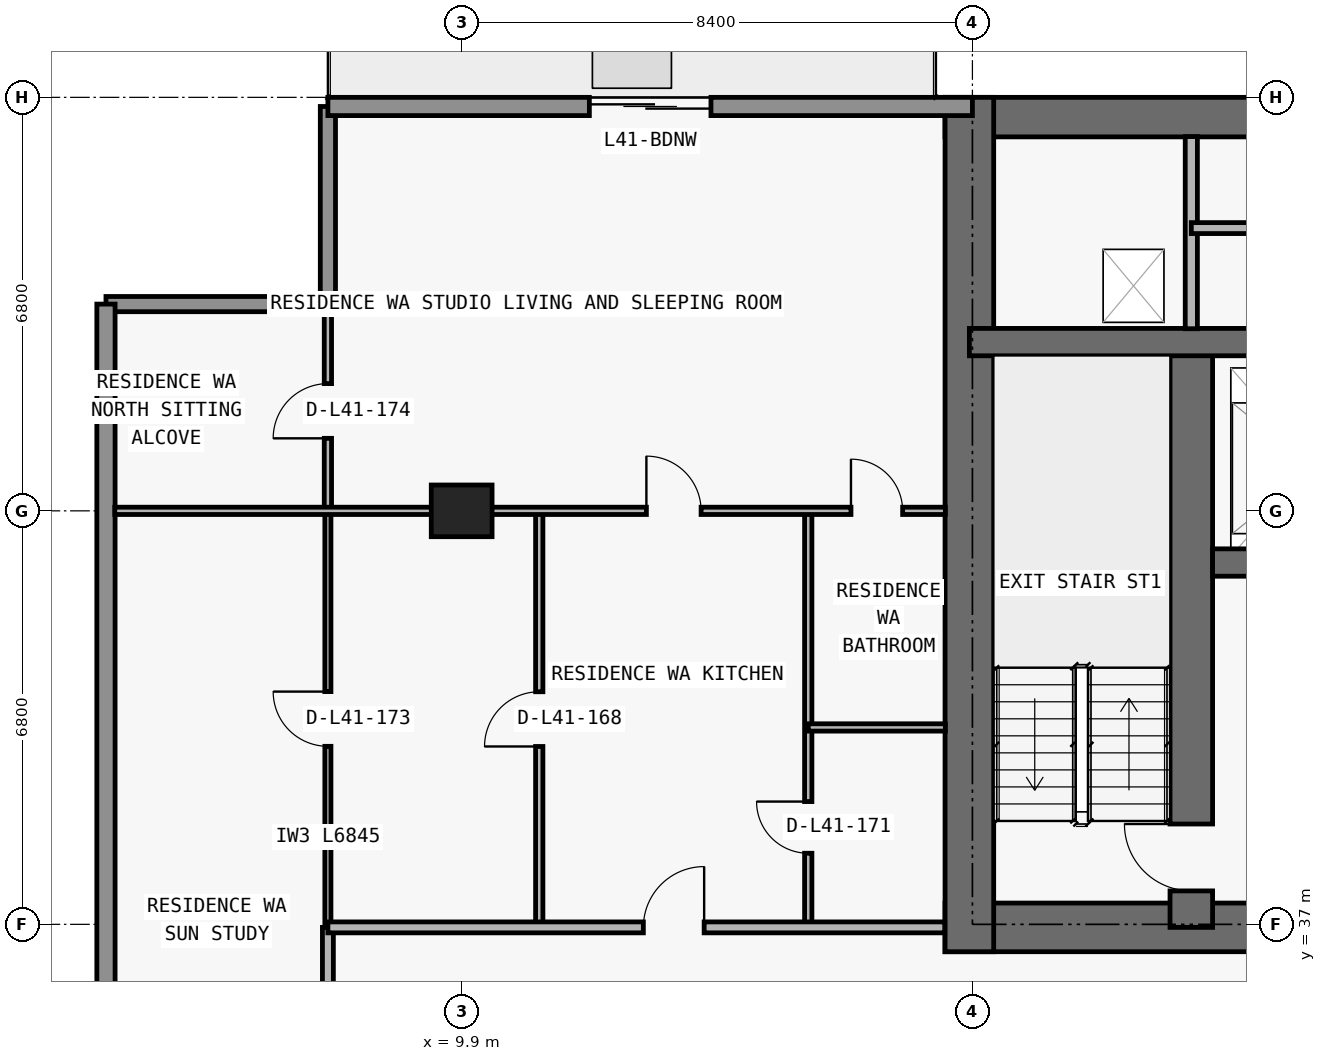
"""IFC4 building model, lengths in metres.
Left out: names, types, materials, properties, quantities, classifications, styles, units other than length and angle.
Written with IfcOpenShell. Run it as: python <this file> out.ifc"""

import sys

from ifc_helpers import new_model, si_unit, direction, frame, frame_2d, origin, origin_2d, place, context, subcontext, project, spatial, rectangle, extrude, element, fill, save


model = new_model("IFC4")
c1 = context("Model", 3, precision=1e-05, world=origin(), true_north=direction((0.0, 1.0)))
c2 = subcontext(c1, "Body", "Model", "MODEL_VIEW")
j1 = project(units=[si_unit("LENGTHUNIT", "METRE"), si_unit("PLANEANGLEUNIT", "RADIAN")], contexts=[c1])
p1 = place(None, origin())
s1 = spatial("IfcSite", under=j1, at=p1, CompositionType="ELEMENT")
p2 = place(p1, origin())
s2 = spatial("IfcBuilding", under=s1, at=p2, CompositionType="ELEMENT")
p3 = place(p2, frame((0.0, 0.0, 148.8)))
s3 = spatial("IfcBuildingStorey", under=s2, at=p3, CompositionType="ELEMENT", Elevation=148.8)
p4 = place(p3, frame((9.9, 43.8, 0.0), z_axis=(0.0, 0.0, 1.0), x_axis=(1.0, 0.0, 0.0)))
e1 = element("IfcColumn", 1, at=p4, inside=s3, PredefinedType="COLUMN", context=c2, shape_type="SweptSolid", body=[
    extrude(rectangle(XDim=1.0, YDim=0.85, at=origin_2d()), origin(), (0.0, 0.0, 1.0), 3.0),
])
p5 = place(p3, frame((17.85, 36.95, 0.0), z_axis=(0.0, 0.0, 1.0), x_axis=(1.0, 0.0, 0.0)))
e2 = element("IfcWall", 2, at=p5, inside=s3, PredefinedType="SHEAR", context=c2, shape_type="SweptSolid", body=[
    extrude(rectangle(XDim=42.1, YDim=0.8, at=frame_2d((21.05, 0.0))), origin(), (0.0, 0.0, 1.0), 3.0),
])
p6 = place(p5, frame((14.45, 0.0, 0.0)))
e3 = element("IfcOpeningElement", 3, at=p6, cuts=e2, PredefinedType="OPENING", context=c2, shape_type="SweptSolid", body=[
    extrude(rectangle(XDim=1.1, YDim=2.15, at=frame_2d((0.55, 1.075))), frame((0.0, 0.41, 0.0), z_axis=(0.0, -1.0, 0.0), x_axis=(1.0, 0.0, 0.0)), (0.0, 0.0, 1.0), 0.82),
])
p7 = place(p5, frame((6.3, 0.0, 0.0)))
e4 = element("IfcOpeningElement", 4, at=p7, cuts=e2, PredefinedType="OPENING", context=c2, shape_type="SweptSolid", body=[
    extrude(rectangle(XDim=1.05, YDim=2.15, at=frame_2d((0.525, 1.075))), frame((0.0, 0.41, 0.0), z_axis=(0.0, -1.0, 0.0), x_axis=(1.0, 0.0, 0.0)), (0.0, 0.0, 1.0), 0.82),
])
p8 = place(p5, frame((34.8, 0.0, 0.0)))
e5 = element("IfcOpeningElement", 5, at=p8, cuts=e2, PredefinedType="OPENING", context=c2, shape_type="SweptSolid", body=[
    extrude(rectangle(XDim=1.05, YDim=2.15, at=frame_2d((0.525, 1.075))), frame((0.0, 0.41, 0.0), z_axis=(0.0, -1.0, 0.0), x_axis=(1.0, 0.0, 0.0)), (0.0, 0.0, 1.0), 0.82),
])
p9 = place(p5, frame((10.913, 0.0, 0.0)))
e6 = element("IfcOpeningElement", 6, at=p9, cuts=e2, PredefinedType="OPENING", context=c2, shape_type="SweptSolid", body=[
    extrude(rectangle(XDim=1.05, YDim=2.15, at=frame_2d((0.525, 1.075))), frame((0.0, 0.41, 0.0), z_axis=(0.0, -1.0, 0.0), x_axis=(1.0, 0.0, 0.0)), (0.0, 0.0, 1.0), 0.82),
])
p10 = place(p5, frame((24.15, 0.0, 0.0)))
e7 = element("IfcOpeningElement", 7, at=p10, cuts=e2, PredefinedType="OPENING", context=c2, shape_type="SweptSolid", body=[
    extrude(rectangle(XDim=1.05, YDim=2.15, at=frame_2d((0.525, 1.075))), frame((0.0, 0.41, 0.0), z_axis=(0.0, -1.0, 0.0), x_axis=(1.0, 0.0, 0.0)), (0.0, 0.0, 1.0), 0.82),
])
p11 = place(p3, frame((17.85, 50.275, 0.0), z_axis=(0.0, 0.0, 1.0), x_axis=(1.0, 0.0, 0.0)))
e8 = element("IfcWall", 8, at=p11, inside=s3, PredefinedType="SHEAR", context=c2, shape_type="SweptSolid", body=[
    extrude(rectangle(XDim=42.1, YDim=0.65, at=frame_2d((21.05, 0.0))), origin(), (0.0, 0.0, 1.0), 3.0),
])
p12 = place(p3, frame((18.25, 36.55, 0.0), z_axis=(0.0, 0.0, 1.0), x_axis=(0.0, 1.0, 0.0)))
e9 = element("IfcWall", 9, at=p12, inside=s3, PredefinedType="SHEAR", context=c2, shape_type="SweptSolid", body=[
    extrude(rectangle(XDim=14.05, YDim=0.8, at=frame_2d((7.025, 0.0))), origin(), (0.0, 0.0, 1.0), 3.0),
])
p13 = place(p3, frame((21.9, 36.95, 0.0), z_axis=(0.0, 0.0, 1.0), x_axis=(0.0, 1.0, 0.0)))
e10 = element("IfcWall", 10, at=p13, inside=s3, PredefinedType="SHEAR", context=c2, shape_type="SweptSolid", body=[
    extrude(rectangle(XDim=9.625, YDim=0.7, at=frame_2d((4.812, 0.0))), origin(), (0.0, 0.0, 1.0), 3.0),
])
p14 = place(p13, frame((0.6, 0.0, 0.0)))
e11 = element("IfcOpeningElement", 11, at=p14, cuts=e10, PredefinedType="OPENING", context=c2, shape_type="SweptSolid", body=[
    extrude(rectangle(XDim=1.1, YDim=2.15, at=frame_2d((0.55, 1.075))), frame((0.0, 0.36, 0.0), z_axis=(0.0, -1.0, 0.0), x_axis=(1.0, 0.0, 0.0)), (0.0, 0.0, 1.0), 0.72),
])
p15 = place(p3, frame((22.25, 42.95, 0.0), z_axis=(0.0, 0.0, 1.0), x_axis=(1.0, 0.0, 0.0)))
e12 = element("IfcWall", 12, at=p15, inside=s3, PredefinedType="SHEAR", context=c2, shape_type="SweptSolid", body=[
    extrude(rectangle(XDim=33.3, YDim=0.45, at=frame_2d((16.65, 0.0))), origin(), (0.0, 0.0, 1.0), 3.0),
])
p16 = place(p15, frame((1.05, 0.0, 0.0)))
e13 = element("IfcOpeningElement", 13, at=p16, cuts=e12, PredefinedType="OPENING", context=c2, shape_type="SweptSolid", body=[
    extrude(rectangle(XDim=1.2, YDim=2.2, at=frame_2d((0.6, 1.1))), frame((0.0, 0.235, 0.0), z_axis=(0.0, -1.0, 0.0), x_axis=(1.0, 0.0, 0.0)), (0.0, 0.0, 1.0), 0.47),
])
p17 = place(p15, frame((31.05, 0.0, 0.0)))
e14 = element("IfcOpeningElement", 14, at=p17, cuts=e12, PredefinedType="OPENING", context=c2, shape_type="SweptSolid", body=[
    extrude(rectangle(XDim=1.2, YDim=2.2, at=frame_2d((0.6, 1.1))), frame((0.0, 0.235, 0.0), z_axis=(0.0, -1.0, 0.0), x_axis=(1.0, 0.0, 0.0)), (0.0, 0.0, 1.0), 0.47),
])
p18 = place(p15, frame((21.4, 0.0, 0.0)))
e15 = element("IfcOpeningElement", 15, at=p18, cuts=e12, PredefinedType="OPENING", context=c2, shape_type="SweptSolid", body=[
    extrude(rectangle(XDim=1.1, YDim=2.2, at=frame_2d((0.55, 1.1))), frame((0.0, 0.235, 0.0), z_axis=(0.0, -1.0, 0.0), x_axis=(1.0, 0.0, 0.0)), (0.0, 0.0, 1.0), 0.47),
])
p19 = place(p15, frame((24.0, 0.0, 0.0)))
e16 = element("IfcOpeningElement", 16, at=p19, cuts=e12, PredefinedType="OPENING", context=c2, shape_type="SweptSolid", body=[
    extrude(rectangle(XDim=1.1, YDim=2.2, at=frame_2d((0.55, 1.1))), frame((0.0, 0.235, 0.0), z_axis=(0.0, -1.0, 0.0), x_axis=(1.0, 0.0, 0.0)), (0.0, 0.0, 1.0), 0.47),
])
p20 = place(p15, frame((3.625, 0.0, 0.0)))
e17 = element("IfcOpeningElement", 17, at=p20, cuts=e12, PredefinedType="OPENING", context=c2, shape_type="SweptSolid", body=[
    extrude(rectangle(XDim=1.05, YDim=2.15, at=frame_2d((0.525, 1.075))), frame((0.0, 0.235, 0.0), z_axis=(0.0, -1.0, 0.0), x_axis=(1.0, 0.0, 0.0)), (0.0, 0.0, 1.0), 0.47),
])
p21 = place(p15, frame((28.675, 0.0, 0.0)))
e18 = element("IfcOpeningElement", 18, at=p21, cuts=e12, PredefinedType="OPENING", context=c2, shape_type="SweptSolid", body=[
    extrude(rectangle(XDim=1.05, YDim=2.15, at=frame_2d((0.525, 1.075))), frame((0.0, 0.235, 0.0), z_axis=(0.0, -1.0, 0.0), x_axis=(1.0, 0.0, 0.0)), (0.0, 0.0, 1.0), 0.47),
])
p22 = place(p15, frame((13.925, 0.0, 0.0)))
e19 = element("IfcOpeningElement", 19, at=p22, cuts=e12, PredefinedType="OPENING", context=c2, shape_type="SweptSolid", body=[
    extrude(rectangle(XDim=1.0, YDim=2.2, at=frame_2d((0.5, 1.1))), frame((0.0, 0.235, 0.0), z_axis=(0.0, -1.0, 0.0), x_axis=(1.0, 0.0, 0.0)), (0.0, 0.0, 1.0), 0.47),
])
p23 = place(p15, frame((18.05, 0.0, 0.0)))
e20 = element("IfcOpeningElement", 20, at=p23, cuts=e12, PredefinedType="OPENING", context=c2, shape_type="SweptSolid", body=[
    extrude(rectangle(XDim=1.0, YDim=2.2, at=frame_2d((0.5, 1.1))), frame((0.0, 0.235, 0.0), z_axis=(0.0, -1.0, 0.0), x_axis=(1.0, 0.0, 0.0)), (0.0, 0.0, 1.0), 0.47),
])
p24 = place(p3, frame((18.25, 46.575, 0.0), z_axis=(0.0, 0.0, 1.0), x_axis=(1.0, 0.0, 0.0)))
e21 = element("IfcWall", 21, at=p24, inside=s3, PredefinedType="SHEAR", context=c2, shape_type="SweptSolid", body=[
    extrude(rectangle(XDim=41.3, YDim=0.45, at=frame_2d((20.65, 0.0))), origin(), (0.0, 0.0, 1.0), 3.0),
])
p25 = place(p24, frame((7.625, 0.0, 0.0)))
e22 = element("IfcOpeningElement", 22, at=p25, cuts=e21, PredefinedType="OPENING", context=c2, shape_type="SweptSolid", body=[
    extrude(rectangle(XDim=1.05, YDim=2.15, at=frame_2d((0.525, 1.075))), frame((0.0, 0.235, 0.0), z_axis=(0.0, -1.0, 0.0), x_axis=(1.0, 0.0, 0.0)), (0.0, 0.0, 1.0), 0.47),
])
p26 = place(p24, frame((32.675, 0.0, 0.0)))
e23 = element("IfcOpeningElement", 23, at=p26, cuts=e21, PredefinedType="OPENING", context=c2, shape_type="SweptSolid", body=[
    extrude(rectangle(XDim=1.05, YDim=2.15, at=frame_2d((0.525, 1.075))), frame((0.0, 0.235, 0.0), z_axis=(0.0, -1.0, 0.0), x_axis=(1.0, 0.0, 0.0)), (0.0, 0.0, 1.0), 0.47),
])
p27 = place(p3, frame((4.05, 47.2, 0.0), z_axis=(0.0, 0.0, 1.0), x_axis=(1.0, 0.0, 0.0)))
e24 = element("IfcWall", 24, at=p27, inside=s3, PredefinedType="ELEMENTEDWALL", context=c2, shape_type="SweptSolid", body=[
    extrude(rectangle(XDim=3.65, YDim=0.25, at=frame_2d((1.825, 0.0))), origin(), (0.0, 0.0, 1.0), 3.0),
])
p28 = place(p3, frame((7.7, 47.2, 0.0), z_axis=(0.0, 0.0, 1.0), x_axis=(0.0, 1.0, 0.0)))
e25 = element("IfcWall", 25, at=p28, inside=s3, PredefinedType="ELEMENTEDWALL", context=c2, shape_type="SweptSolid", body=[
    extrude(rectangle(XDim=3.25, YDim=0.25, at=frame_2d((1.625, 0.0))), origin(), (0.0, 0.0, 1.0), 3.0),
])
p29 = place(p3, frame((4.05, 28.0, 0.0), z_axis=(0.0, 0.0, 1.0), x_axis=(0.0, 1.0, 0.0)))
e26 = element("IfcWall", 26, at=p29, inside=s3, PredefinedType="STANDARD", context=c2, shape_type="SweptSolid", body=[
    extrude(rectangle(XDim=19.2, YDim=0.3, at=frame_2d((9.6, 0.0))), origin(), (0.0, 0.0, 1.0), 3.0),
])
p30 = place(p3, frame((7.7, 50.45, 0.0), z_axis=(0.0, 0.0, 1.0), x_axis=(1.0, 0.0, 0.0)))
e27 = element("IfcWall", 27, at=p30, inside=s3, PredefinedType="STANDARD", context=c2, shape_type="SweptSolid", body=[
    extrude(rectangle(XDim=10.6, YDim=0.3, at=frame_2d((5.3, 0.0))), origin(), (0.0, 0.0, 1.0), 3.0),
])
p31 = place(p30, frame((4.3, 0.0, 0.0)))
e28 = element("IfcOpeningElement", 28, at=p31, cuts=e27, PredefinedType="OPENING", context=c2, shape_type="SweptSolid", body=[
    extrude(rectangle(XDim=2.0, YDim=2.3, at=frame_2d((1.0, 1.15))), frame((0.0, 0.16, 0.0), z_axis=(0.0, -1.0, 0.0), x_axis=(1.0, 0.0, 0.0)), (0.0, 0.0, 1.0), 0.32),
])
p32 = place(p3, frame((7.7, 34.205, 0.0), z_axis=(0.0, 0.0, 1.0), x_axis=(0.0, 1.0, 0.0)))
e29 = element("IfcWall", 29, at=p32, inside=s3, PredefinedType="PARTITIONING", context=c2, shape_type="SweptSolid", body=[
    extrude(rectangle(XDim=2.745, YDim=0.18, at=frame_2d((1.373, 0.0))), origin(), (0.0, 0.0, 1.0), 3.0),
])
p33 = place(p3, frame((7.7, 36.955, 0.0), z_axis=(0.0, 0.0, 1.0), x_axis=(0.0, 1.0, 0.0)))
e30 = element("IfcWall", 30, at=p33, inside=s3, PredefinedType="MOVABLE", context=c2, shape_type="SweptSolid", body=[
    extrude(rectangle(XDim=6.845, YDim=0.1, at=frame_2d((3.422, 0.0))), origin(), (0.0, 0.0, 1.0), 3.0),
])
p34 = place(p33, frame((2.972, 0.0, 0.0)))
e31 = element("IfcOpeningElement", 31, at=p34, cuts=e30, PredefinedType="OPENING", context=c2, shape_type="SweptSolid", body=[
    extrude(rectangle(XDim=0.9, YDim=2.15, at=frame_2d((0.45, 1.075))), frame((0.0, 0.06, 0.0), z_axis=(0.0, -1.0, 0.0), x_axis=(1.0, 0.0, 0.0)), (0.0, 0.0, 1.0), 0.12),
])
p35 = place(p3, frame((7.7, 43.805, 0.0), z_axis=(0.0, 0.0, 1.0), x_axis=(0.0, 1.0, 0.0)))
e32 = element("IfcWall", 32, at=p35, inside=s3, PredefinedType="PARTITIONING", context=c2, shape_type="SweptSolid", body=[
    extrude(rectangle(XDim=3.275, YDim=0.12, at=frame_2d((1.638, 0.0))), origin(), (0.0, 0.0, 1.0), 3.0),
])
p36 = place(p35, frame((1.188, 0.0, 0.0)))
e33 = element("IfcOpeningElement", 33, at=p36, cuts=e32, PredefinedType="OPENING", context=c2, shape_type="SweptSolid", body=[
    extrude(rectangle(XDim=0.9, YDim=2.15, at=frame_2d((0.45, 1.075))), frame((0.0, 0.07, 0.0), z_axis=(0.0, -1.0, 0.0), x_axis=(1.0, 0.0, 0.0)), (0.0, 0.0, 1.0), 0.14),
])
p37 = place(p3, frame((11.176, 36.95, 0.0), z_axis=(0.0, 0.0, 1.0), x_axis=(0.0, 1.0, 0.0)))
e34 = element("IfcWall", 34, at=p37, inside=s3, PredefinedType="PARTITIONING", context=c2, shape_type="SweptSolid", body=[
    extrude(rectangle(XDim=6.85, YDim=0.12, at=frame_2d((3.425, 0.0))), origin(), (0.0, 0.0, 1.0), 3.0),
])
p38 = place(p37, frame((2.975, 0.0, 0.0)))
e35 = element("IfcOpeningElement", 35, at=p38, cuts=e34, PredefinedType="OPENING", context=c2, shape_type="SweptSolid", body=[
    extrude(rectangle(XDim=0.9, YDim=2.15, at=frame_2d((0.45, 1.075))), frame((0.0, 0.07, 0.0), z_axis=(0.0, -1.0, 0.0), x_axis=(1.0, 0.0, 0.0)), (0.0, 0.0, 1.0), 0.14),
])
p39 = place(p3, frame((15.6, 36.95, 0.0), z_axis=(0.0, 0.0, 1.0), x_axis=(0.0, 1.0, 0.0)))
e36 = element("IfcWall", 36, at=p39, inside=s3, PredefinedType="PARTITIONING", context=c2, shape_type="SweptSolid", body=[
    extrude(rectangle(XDim=6.85, YDim=0.12, at=frame_2d((3.425, 0.0))), origin(), (0.0, 0.0, 1.0), 3.0),
])
p40 = place(p39, frame((1.219, 0.0, 0.0)))
e37 = element("IfcOpeningElement", 37, at=p40, cuts=e36, PredefinedType="OPENING", context=c2, shape_type="SweptSolid", body=[
    extrude(rectangle(XDim=0.85, YDim=2.1, at=frame_2d((0.425, 1.05))), frame((0.0, 0.07, 0.0), z_axis=(0.0, -1.0, 0.0), x_axis=(1.0, 0.0, 0.0)), (0.0, 0.0, 1.0), 0.14),
])
p41 = place(p3, frame((21.9, 46.795, 0.0), z_axis=(0.0, 0.0, 1.0), x_axis=(0.0, 1.0, 0.0)))
e38 = element("IfcWall", 38, at=p41, inside=s3, PredefinedType="PARTITIONING", context=c2, shape_type="SweptSolid", body=[
    extrude(rectangle(XDim=3.16, YDim=0.2, at=frame_2d((1.58, 0.0))), origin(), (0.0, 0.0, 1.0), 3.0),
])
p42 = place(p3, frame((7.7, 36.95, 0.0), z_axis=(0.0, 0.0, 1.0), x_axis=(1.0, 0.0, 0.0)))
e39 = element("IfcWall", 39, at=p42, inside=s3, PredefinedType="PARTITIONING", context=c2, shape_type="SweptSolid", body=[
    extrude(rectangle(XDim=10.145, YDim=0.18, at=frame_2d((5.073, 0.0))), origin(), (0.0, 0.0, 1.0), 3.0),
])
p43 = place(p42, frame((5.188, 0.0, 0.0)))
e40 = element("IfcOpeningElement", 40, at=p43, cuts=e39, PredefinedType="OPENING", context=c2, shape_type="SweptSolid", body=[
    extrude(rectangle(XDim=1.0, YDim=2.2, at=frame_2d((0.5, 1.1))), frame((0.0, 0.1, 0.0), z_axis=(0.0, -1.0, 0.0), x_axis=(1.0, 0.0, 0.0)), (0.0, 0.0, 1.0), 0.2),
])
p44 = place(p3, frame((15.6, 40.238, 0.0), z_axis=(0.0, 0.0, 1.0), x_axis=(1.0, 0.0, 0.0)))
e41 = element("IfcWall", 41, at=p44, inside=s3, PredefinedType="PARTITIONING", context=c2, shape_type="SweptSolid", body=[
    extrude(rectangle(XDim=2.255, YDim=0.12, at=frame_2d((1.127, 0.0))), origin(), (0.0, 0.0, 1.0), 3.0),
])
p45 = place(p3, frame((4.195, 43.8, 0.0), z_axis=(0.0, 0.0, 1.0), x_axis=(1.0, 0.0, 0.0)))
e42 = element("IfcWall", 42, at=p45, inside=s3, PredefinedType="PARTITIONING", context=c2, shape_type="SweptSolid", body=[
    extrude(rectangle(XDim=13.66, YDim=0.12, at=frame_2d((6.83, 0.0))), origin(), (0.0, 0.0, 1.0), 2.289),
])
p46 = place(p45, frame((8.743, 0.0, 0.0)))
e43 = element("IfcOpeningElement", 43, at=p46, cuts=e42, PredefinedType="OPENING", context=c2, shape_type="SweptSolid", body=[
    extrude(rectangle(XDim=0.9, YDim=2.15, at=frame_2d((0.45, 1.075))), frame((0.0, 0.07, 0.0), z_axis=(0.0, -1.0, 0.0), x_axis=(1.0, 0.0, 0.0)), (0.0, 0.0, 1.0), 0.14),
])
p47 = place(p45, frame((12.107, 0.0, 0.0)))
e44 = element("IfcOpeningElement", 44, at=p47, cuts=e42, PredefinedType="OPENING", context=c2, shape_type="SweptSolid", body=[
    extrude(rectangle(XDim=0.85, YDim=2.1, at=frame_2d((0.425, 1.05))), frame((0.0, 0.07, 0.0), z_axis=(0.0, -1.0, 0.0), x_axis=(1.0, 0.0, 0.0)), (0.0, 0.0, 1.0), 0.14),
])
p48 = place(p3, frame((21.9, 48.45, 0.0), z_axis=(0.0, 0.0, 1.0), x_axis=(1.0, 0.0, 0.0)))
e45 = element("IfcWall", 45, at=p48, inside=s3, PredefinedType="PARTITIONING", context=c2, shape_type="SweptSolid", body=[
    extrude(rectangle(XDim=4.75, YDim=0.18, at=frame_2d((2.375, 0.0))), origin(), (0.0, 0.0, 1.0), 3.0),
])
p49 = place(p48, frame((1.775, 0.0, 0.0)))
e46 = element("IfcOpeningElement", 46, at=p49, cuts=e45, PredefinedType="OPENING", context=c2, shape_type="SweptSolid", body=[
    extrude(rectangle(XDim=1.2, YDim=2.2, at=frame_2d((0.6, 1.1))), frame((0.0, 0.1, 0.0), z_axis=(0.0, -1.0, 0.0), x_axis=(1.0, 0.0, 0.0)), (0.0, 0.0, 1.0), 0.2),
])
p50 = place(p31, origin())
e47 = element("IfcDoor", 47, at=p50, inside=s3, OperationType="DOUBLE_DOOR_SLIDING", PredefinedType="DOOR", context=c2, shape_type="SweptSolid", body=[
    extrude(rectangle(XDim=2.0, YDim=2.3, at=frame_2d((1.0, 1.15))), frame((0.0, 0.025, 0.0), z_axis=(0.0, -1.0, 0.0), x_axis=(1.0, 0.0, 0.0)), (0.0, 0.0, 1.0), 0.05),
])
fill(e28, e47)
p51 = place(p14, origin())
e48 = element("IfcDoor", 48, at=p51, inside=s3, OperationType="SINGLE_SWING_RIGHT", PredefinedType="DOOR", context=c2, shape_type="SweptSolid", body=[
    extrude(rectangle(XDim=1.1, YDim=2.15, at=frame_2d((0.55, 1.075))), frame((0.0, 0.025, 0.0), z_axis=(0.0, -1.0, 0.0), x_axis=(1.0, 0.0, 0.0)), (0.0, 0.0, 1.0), 0.05),
])
fill(e11, e48)
p52 = place(p38, origin())
e49 = element("IfcDoor", 49, at=p52, inside=s3, OperationType="SINGLE_SWING_LEFT", PredefinedType="DOOR", context=c2, shape_type="SweptSolid", body=[
    extrude(rectangle(XDim=0.9, YDim=2.15, at=frame_2d((0.45, 1.075))), frame((0.0, 0.025, 0.0), z_axis=(0.0, -1.0, 0.0), x_axis=(1.0, 0.0, 0.0)), (0.0, 0.0, 1.0), 0.05),
])
fill(e35, e49)
p53 = place(p43, origin())
e50 = element("IfcDoor", 50, at=p53, inside=s3, OperationType="SINGLE_SWING_RIGHT", PredefinedType="DOOR", context=c2, shape_type="SweptSolid", body=[
    extrude(rectangle(XDim=1.0, YDim=2.2, at=frame_2d((0.5, 1.1))), frame((0.0, 0.025, 0.0), z_axis=(0.0, -1.0, 0.0), x_axis=(1.0, 0.0, 0.0)), (0.0, 0.0, 1.0), 0.05),
])
fill(e40, e50)
p54 = place(p46, origin())
e51 = element("IfcDoor", 51, at=p54, inside=s3, OperationType="SINGLE_SWING_LEFT", PredefinedType="DOOR", context=c2, shape_type="SweptSolid", body=[
    extrude(rectangle(XDim=0.9, YDim=2.15, at=frame_2d((0.45, 1.075))), frame((0.0, 0.025, 0.0), z_axis=(0.0, -1.0, 0.0), x_axis=(1.0, 0.0, 0.0)), (0.0, 0.0, 1.0), 0.05),
])
fill(e43, e51)
p55 = place(p40, origin())
e52 = element("IfcDoor", 52, at=p55, inside=s3, OperationType="SINGLE_SWING_RIGHT", PredefinedType="DOOR", context=c2, shape_type="SweptSolid", body=[
    extrude(rectangle(XDim=0.85, YDim=2.1, at=frame_2d((0.425, 1.05))), frame((0.0, 0.025, 0.0), z_axis=(0.0, -1.0, 0.0), x_axis=(1.0, 0.0, 0.0)), (0.0, 0.0, 1.0), 0.05),
])
fill(e37, e52)
p56 = place(p47, origin())
e53 = element("IfcDoor", 53, at=p56, inside=s3, OperationType="SINGLE_SWING_LEFT", PredefinedType="DOOR", context=c2, shape_type="SweptSolid", body=[
    extrude(rectangle(XDim=0.85, YDim=2.1, at=frame_2d((0.425, 1.05))), frame((0.0, 0.025, 0.0), z_axis=(0.0, -1.0, 0.0), x_axis=(1.0, 0.0, 0.0)), (0.0, 0.0, 1.0), 0.05),
])
fill(e44, e53)
p57 = place(p34, origin())
e54 = element("IfcDoor", 54, at=p57, inside=s3, OperationType="SINGLE_SWING_RIGHT", PredefinedType="DOOR", context=c2, shape_type="SweptSolid", body=[
    extrude(rectangle(XDim=0.9, YDim=2.15, at=frame_2d((0.45, 1.075))), frame((0.0, 0.025, 0.0), z_axis=(0.0, -1.0, 0.0), x_axis=(1.0, 0.0, 0.0)), (0.0, 0.0, 1.0), 0.05),
])
fill(e31, e54)
p58 = place(p36, origin())
e55 = element("IfcDoor", 55, at=p58, inside=s3, OperationType="SINGLE_SWING_LEFT", PredefinedType="DOOR", context=c2, shape_type="SweptSolid", body=[
    extrude(rectangle(XDim=0.9, YDim=2.15, at=frame_2d((0.45, 1.075))), frame((0.0, 0.025, 0.0), z_axis=(0.0, -1.0, 0.0), x_axis=(1.0, 0.0, 0.0)), (0.0, 0.0, 1.0), 0.05),
])
fill(e33, e55)
save(model, sys.argv[1])
